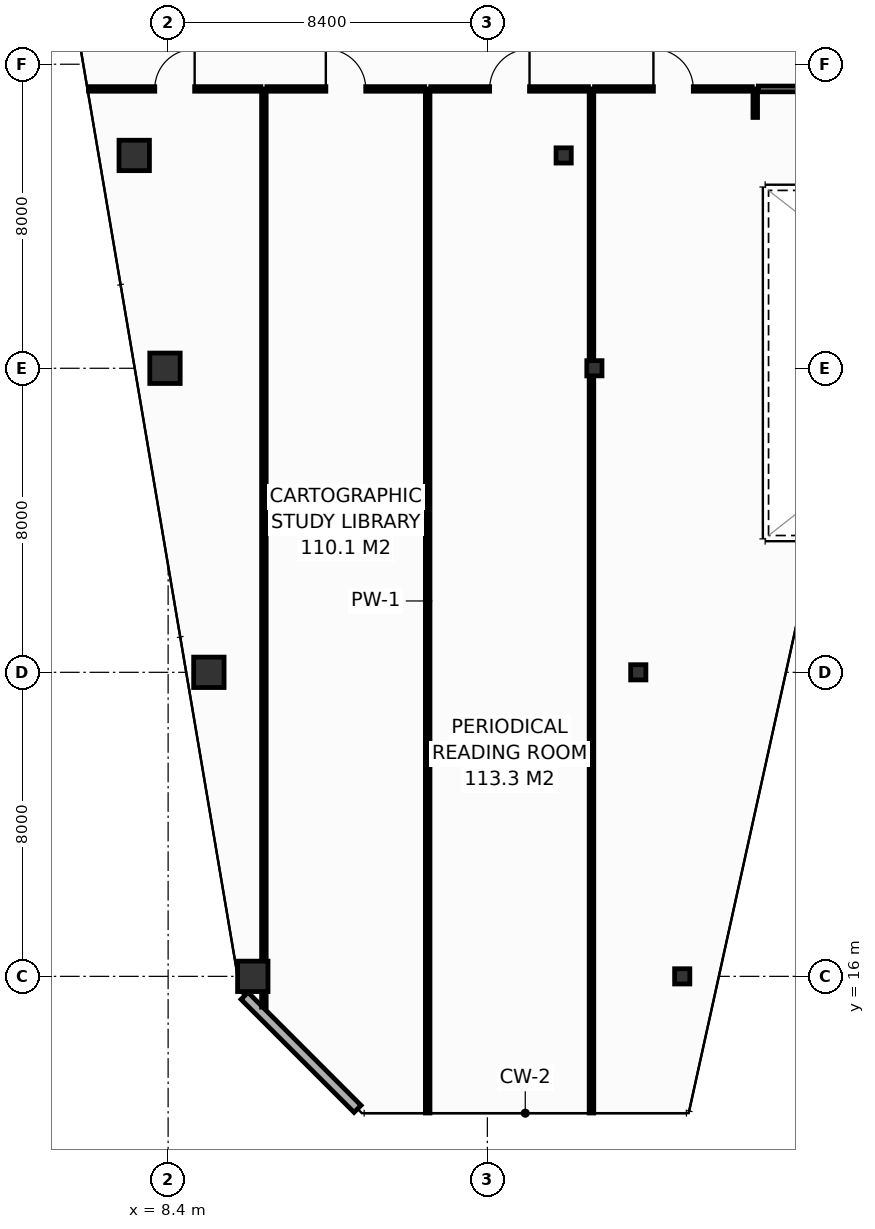
"""IFC4 building model, lengths in metres.
Left out: names, types, materials, properties, quantities, classifications, styles, units other than length and angle.
Written with IfcOpenShell. Run it as: python <this file> out.ifc"""

import sys

from ifc_helpers import new_model, si_unit, direction, frame, frame_2d, origin, origin_2d, place, context, subcontext, project, spatial, rectangle, hollow_rectangle, extrude, element, fill, save


model = new_model("IFC4")
c1 = context("Model", 3, precision=1e-05, world=origin(), true_north=direction((0.0, 1.0)))
c2 = subcontext(c1, "Body", "Model", "MODEL_VIEW")
j1 = project(units=[si_unit("LENGTHUNIT", "METRE"), si_unit("PLANEANGLEUNIT", "RADIAN")], contexts=[c1])
p1 = place(None, origin())
s1 = spatial("IfcSite", under=j1, at=p1, CompositionType="ELEMENT")
p2 = place(p1, origin())
s2 = spatial("IfcBuilding", under=s1, at=p2, CompositionType="ELEMENT")
p3 = place(p2, frame((0.0, 0.0, 190.4)))
s3 = spatial("IfcBuildingStorey", under=s2, at=p3, CompositionType="ELEMENT", Elevation=190.4)
p4 = place(p3, frame((10.628, 16.0, 0.0), z_axis=(0.0, 0.0, 1.0), x_axis=(1.0, 0.0, 0.0)))
e1 = element("IfcColumn", 1, at=p4, inside=s3, PredefinedType="COLUMN", context=c2, shape_type="SweptSolid", body=[
    extrude(hollow_rectangle(XDim=0.8, YDim=0.8, WallThickness=0.036, at=origin_2d()), origin(), (0.0, 0.0, 1.0), 3.8),
])
p5 = place(p3, frame((21.928, 16.0, 0.0), z_axis=(0.0, 0.0, 1.0), x_axis=(1.0, 0.0, 0.0)))
e2 = element("IfcColumn", 2, at=p5, inside=s3, PredefinedType="COLUMN", context=c2, shape_type="SweptSolid", body=[
    extrude(hollow_rectangle(XDim=0.4, YDim=0.4, WallThickness=0.016, at=origin_2d()), origin(), (0.0, 0.0, 1.0), 3.8),
])
p6 = place(p3, frame((9.472, 24.0, 0.0), z_axis=(0.0, 0.0, 1.0), x_axis=(1.0, 0.0, 0.0)))
e3 = element("IfcColumn", 3, at=p6, inside=s3, PredefinedType="COLUMN", context=c2, shape_type="SweptSolid", body=[
    extrude(hollow_rectangle(XDim=0.8, YDim=0.8, WallThickness=0.036, at=origin_2d()), origin(), (0.0, 0.0, 1.0), 3.8),
])
p7 = place(p3, frame((20.772, 24.0, 0.0), z_axis=(0.0, 0.0, 1.0), x_axis=(1.0, 0.0, 0.0)))
e4 = element("IfcColumn", 4, at=p7, inside=s3, PredefinedType="COLUMN", context=c2, shape_type="SweptSolid", body=[
    extrude(hollow_rectangle(XDim=0.4, YDim=0.4, WallThickness=0.016, at=origin_2d()), origin(), (0.0, 0.0, 1.0), 3.8),
])
p8 = place(p3, frame((8.317, 32.0, 0.0), z_axis=(0.0, 0.0, 1.0), x_axis=(1.0, 0.0, 0.0)))
e5 = element("IfcColumn", 5, at=p8, inside=s3, PredefinedType="COLUMN", context=c2, shape_type="SweptSolid", body=[
    extrude(hollow_rectangle(XDim=0.8, YDim=0.8, WallThickness=0.036, at=origin_2d()), origin(), (0.0, 0.0, 1.0), 3.8),
])
p9 = place(p3, frame((19.617, 32.0, 0.0), z_axis=(0.0, 0.0, 1.0), x_axis=(1.0, 0.0, 0.0)))
e6 = element("IfcColumn", 6, at=p9, inside=s3, PredefinedType="COLUMN", context=c2, shape_type="SweptSolid", body=[
    extrude(hollow_rectangle(XDim=0.4, YDim=0.4, WallThickness=0.016, at=origin_2d()), origin(), (0.0, 0.0, 1.0), 3.8),
])
p10 = place(p3, frame((7.508, 37.6, 0.0), z_axis=(0.0, 0.0, 1.0), x_axis=(1.0, 0.0, 0.0)))
e7 = element("IfcColumn", 7, at=p10, inside=s3, PredefinedType="COLUMN", context=c2, shape_type="SweptSolid", body=[
    extrude(hollow_rectangle(XDim=0.8, YDim=0.8, WallThickness=0.036, at=origin_2d()), origin(), (0.0, 0.0, 1.0), 3.8),
])
p11 = place(p3, frame((18.808, 37.6, 0.0), z_axis=(0.0, 0.0, 1.0), x_axis=(1.0, 0.0, 0.0)))
e8 = element("IfcColumn", 8, at=p11, inside=s3, PredefinedType="COLUMN", context=c2, shape_type="SweptSolid", body=[
    extrude(hollow_rectangle(XDim=0.4, YDim=0.4, WallThickness=0.016, at=origin_2d()), origin(), (0.0, 0.0, 1.0), 3.8),
])
p12 = place(p3, frame((10.411, 15.487, 0.0), z_axis=(0.0, 0.0, 1.0), x_axis=(0.707135806771, -0.70707775441, 0.0)))
e9 = element("IfcWall", 9, at=p12, inside=s3, PredefinedType="STANDARD", context=c2, shape_type="SweptSolid", body=[
    extrude(rectangle(XDim=4.206, YDim=0.26, at=frame_2d((2.103, 0.0))), origin(), (0.0, 0.0, 1.0), 3.55),
])
p13 = place(p3, frame((10.92, 15.19, 0.0), z_axis=(0.0, 0.0, 1.0), x_axis=(0.0, 1.0, 0.0)))
e10 = element("IfcWall", 10, at=p13, inside=s3, PredefinedType="PARTITIONING", context=c2, shape_type="SweptSolid", body=[
    extrude(rectangle(XDim=24.16, YDim=0.12, at=frame_2d((12.08, 0.0))), origin(), (0.0, 0.0, 1.0), 2.835),
])
for number, where, z_axis, x_axis in (
    (11, (15.23, 12.405, 0.0), (0.0, 0.0, 1.0), (0.0, 1.0, 0.0)),
    (12, (19.54, 12.405, 0.0), (0.0, 0.0, 1.0), (0.0, 1.0, 0.0)),
):
    element("IfcWall", number, at=place(p3, frame(where, z_axis=z_axis, x_axis=x_axis)), inside=s3, PredefinedType="PARTITIONING", context=c2, shape_type="SweptSolid", body=[
        extrude(rectangle(XDim=26.945, YDim=0.12, at=frame_2d((13.473, 0.0))), origin(), (0.0, 0.0, 1.0), 2.835),
    ])
p14 = place(p3, frame((23.85, 38.6, 0.0), z_axis=(0.0, 0.0, 1.0), x_axis=(0.0, 1.0, 0.0)))
e13 = element("IfcWall", 13, at=p14, inside=s3, PredefinedType="PARTITIONING", context=c2, shape_type="SweptSolid", body=[
    extrude(rectangle(XDim=0.75, YDim=0.12, at=frame_2d((0.375, 0.0))), origin(), (0.0, 0.0, 1.0), 3.55),
])
p15 = place(p3, frame((6.305, 39.35, 0.0), z_axis=(0.0, 0.0, 1.0), x_axis=(1.0, 0.0, 0.0)))
e14 = element("IfcWall", 14, at=p15, inside=s3, PredefinedType="PARTITIONING", context=c2, shape_type="SweptSolid", body=[
    extrude(rectangle(XDim=4.535, YDim=0.12, at=frame_2d((2.268, 0.0))), origin(), (0.0, 0.0, 1.0), 3.035),
])
p16 = place(p15, frame((1.743, 0.0, 0.0)))
e15 = element("IfcOpeningElement", 15, at=p16, cuts=e14, PredefinedType="OPENING", context=c2, shape_type="SweptSolid", body=[
    extrude(rectangle(XDim=1.05, YDim=2.15, at=frame_2d((0.525, 1.075))), frame((0.0, 0.07, 0.0), z_axis=(0.0, -1.0, 0.0), x_axis=(1.0, 0.0, 0.0)), (0.0, 0.0, 1.0), 0.14),
])
p17 = place(p3, frame((11.0, 39.35, 0.0), z_axis=(0.0, 0.0, 1.0), x_axis=(1.0, 0.0, 0.0)))
e16 = element("IfcWall", 16, at=p17, inside=s3, PredefinedType="PARTITIONING", context=c2, shape_type="SweptSolid", body=[
    extrude(rectangle(XDim=4.15, YDim=0.12, at=frame_2d((2.075, 0.0))), origin(), (0.0, 0.0, 1.0), 3.55),
])
p18 = place(p17, frame((1.55, 0.0, 0.0)))
e17 = element("IfcOpeningElement", 17, at=p18, cuts=e16, PredefinedType="OPENING", context=c2, shape_type="SweptSolid", body=[
    extrude(rectangle(XDim=1.05, YDim=2.15, at=frame_2d((0.525, 1.075))), frame((0.0, 0.07, 0.0), z_axis=(0.0, -1.0, 0.0), x_axis=(1.0, 0.0, 0.0)), (0.0, 0.0, 1.0), 0.14),
])
p19 = place(p3, frame((15.31, 39.35, 0.0), z_axis=(0.0, 0.0, 1.0), x_axis=(1.0, 0.0, 0.0)))
e18 = element("IfcWall", 18, at=p19, inside=s3, PredefinedType="PARTITIONING", context=c2, shape_type="SweptSolid", body=[
    extrude(rectangle(XDim=4.15, YDim=0.12, at=frame_2d((2.075, 0.0))), origin(), (0.0, 0.0, 1.0), 3.55),
])
p20 = place(p19, frame((1.55, 0.0, 0.0)))
e19 = element("IfcOpeningElement", 19, at=p20, cuts=e18, PredefinedType="OPENING", context=c2, shape_type="SweptSolid", body=[
    extrude(rectangle(XDim=1.05, YDim=2.15, at=frame_2d((0.525, 1.075))), frame((0.0, 0.07, 0.0), z_axis=(0.0, -1.0, 0.0), x_axis=(1.0, 0.0, 0.0)), (0.0, 0.0, 1.0), 0.14),
])
p21 = place(p3, frame((19.62, 39.35, 0.0), z_axis=(0.0, 0.0, 1.0), x_axis=(1.0, 0.0, 0.0)))
e20 = element("IfcWall", 20, at=p21, inside=s3, PredefinedType="PARTITIONING", context=c2, shape_type="SweptSolid", body=[
    extrude(rectangle(XDim=4.15, YDim=0.12, at=frame_2d((2.075, 0.0))), origin(), (0.0, 0.0, 1.0), 2.835),
])
p22 = place(p21, frame((1.55, 0.0, 0.0)))
e21 = element("IfcOpeningElement", 21, at=p22, cuts=e20, PredefinedType="OPENING", context=c2, shape_type="SweptSolid", body=[
    extrude(rectangle(XDim=1.05, YDim=2.15, at=frame_2d((0.525, 1.075))), frame((0.0, 0.07, 0.0), z_axis=(0.0, -1.0, 0.0), x_axis=(1.0, 0.0, 0.0)), (0.0, 0.0, 1.0), 0.14),
])
p23 = place(p3, frame((23.93, 39.35, 0.0), z_axis=(0.0, 0.0, 1.0), x_axis=(1.0, 0.0, 0.0)))
e22 = element("IfcWall", 22, at=p23, inside=s3, PredefinedType="PARTITIONING", context=c2, shape_type="SweptSolid", body=[
    extrude(rectangle(XDim=12.14, YDim=0.15, at=frame_2d((6.07, 0.0))), origin(), (0.0, 0.0, 1.0), 3.55),
])
p24 = place(p16, origin())
e23 = element("IfcDoor", 23, at=p24, inside=s3, OperationType="SINGLE_SWING_RIGHT", PredefinedType="DOOR", context=c2, shape_type="SweptSolid", body=[
    extrude(rectangle(XDim=1.05, YDim=2.15, at=frame_2d((0.525, 1.075))), frame((0.0, 0.025, 0.0), z_axis=(0.0, -1.0, 0.0), x_axis=(1.0, 0.0, 0.0)), (0.0, 0.0, 1.0), 0.05),
])
fill(e15, e23)
p25 = place(p18, origin())
e24 = element("IfcDoor", 24, at=p25, inside=s3, OperationType="SINGLE_SWING_LEFT", PredefinedType="DOOR", context=c2, shape_type="SweptSolid", body=[
    extrude(rectangle(XDim=1.05, YDim=2.15, at=frame_2d((0.525, 1.075))), frame((0.0, 0.025, 0.0), z_axis=(0.0, -1.0, 0.0), x_axis=(1.0, 0.0, 0.0)), (0.0, 0.0, 1.0), 0.05),
])
fill(e17, e24)
p26 = place(p20, origin())
e25 = element("IfcDoor", 25, at=p26, inside=s3, OperationType="SINGLE_SWING_RIGHT", PredefinedType="DOOR", context=c2, shape_type="SweptSolid", body=[
    extrude(rectangle(XDim=1.05, YDim=2.15, at=frame_2d((0.525, 1.075))), frame((0.0, 0.025, 0.0), z_axis=(0.0, -1.0, 0.0), x_axis=(1.0, 0.0, 0.0)), (0.0, 0.0, 1.0), 0.05),
])
fill(e19, e25)
p27 = place(p22, origin())
e26 = element("IfcDoor", 26, at=p27, inside=s3, OperationType="SINGLE_SWING_LEFT", PredefinedType="DOOR", context=c2, shape_type="SweptSolid", body=[
    extrude(rectangle(XDim=1.05, YDim=2.15, at=frame_2d((0.525, 1.075))), frame((0.0, 0.025, 0.0), z_axis=(0.0, -1.0, 0.0), x_axis=(1.0, 0.0, 0.0)), (0.0, 0.0, 1.0), 0.05),
])
fill(e21, e26)
save(model, sys.argv[1])
